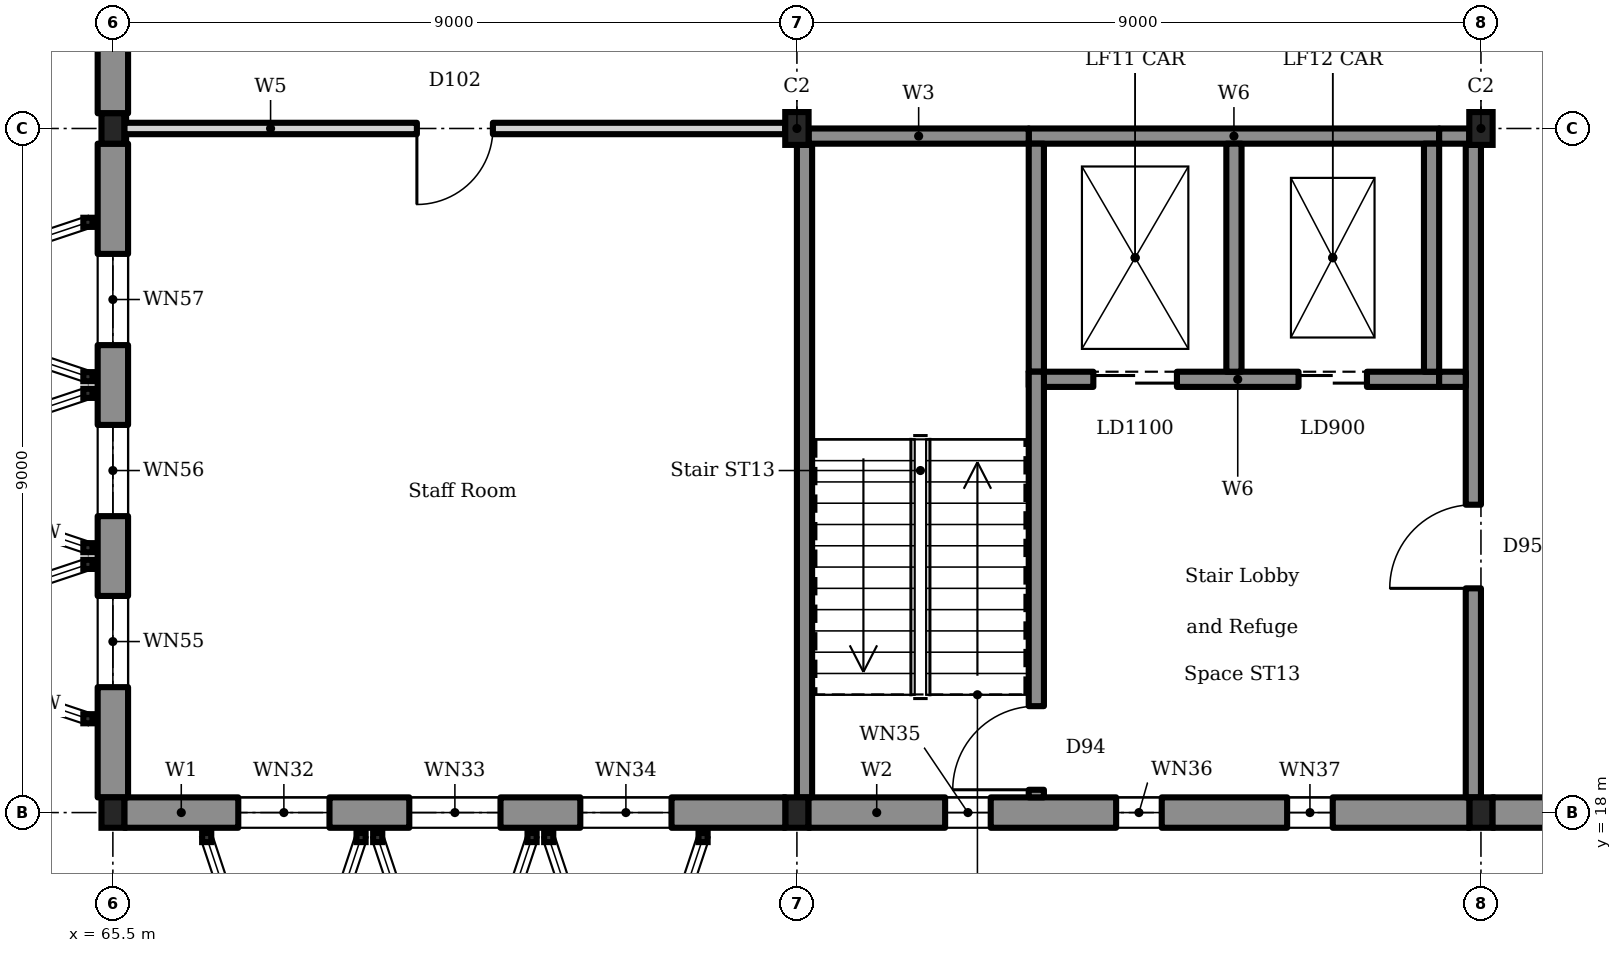
"""IFC4 building model, lengths in metres.
Left out: names, types, materials, properties, quantities, classifications, styles, units other than length and angle.
Written with IfcOpenShell. Run it as: python <this file> out.ifc"""

import sys

from ifc_helpers import new_model, si_unit, direction, frame, frame_2d, origin, origin_2d, place, context, subcontext, project, spatial, rectangle, i_section, extrude, element, fill, save


model = new_model("IFC4")
c1 = context("Model", 3, precision=1e-05, world=origin(), true_north=direction((0.0, 1.0)))
c2 = subcontext(c1, "Body", "Model", "MODEL_VIEW")
j1 = project(units=[si_unit("LENGTHUNIT", "METRE"), si_unit("PLANEANGLEUNIT", "RADIAN")], contexts=[c1])
p1 = place(None, origin())
s1 = spatial("IfcSite", under=j1, at=p1, CompositionType="ELEMENT")
p2 = place(p1, origin())
s2 = spatial("IfcBuilding", under=s1, at=p2, CompositionType="ELEMENT")
p3 = place(p2, frame((0.0, 0.0, 5.4)))
s3 = spatial("IfcBuildingStorey", under=s2, at=p3, CompositionType="ELEMENT", Elevation=5.4)
for number, where, z_axis, x_axis in (
    (1, (65.5, 18.0, 0.0), (0.0, 0.0, 1.0), (1.0, 0.0, 0.0)),
    (2, (74.5, 18.0, 0.0), (0.0, 0.0, 1.0), (1.0, 0.0, 0.0)),
    (3, (83.5, 18.0, 0.0), (0.0, 0.0, 1.0), (1.0, 0.0, 0.0)),
    (4, (65.5, 27.0, 0.0), (0.0, 0.0, 1.0), (1.0, 0.0, 0.0)),
):
    element("IfcColumn", number, at=place(p3, frame(where, z_axis=z_axis, x_axis=x_axis)), inside=s3, PredefinedType="COLUMN", context=c2, shape_type="SweptSolid", body=[
        extrude(i_section(OverallWidth=0.3, OverallDepth=0.4, WebThickness=0.013, FlangeThickness=0.024, FilletRadius=0.027, at=origin_2d()), origin(), (0.0, 0.0, 1.0), 4.5),
    ])
for number, where, z_axis, x_axis in (
    (5, (74.5, 27.0, 0.0), (0.0, 0.0, 1.0), (1.0, 0.0, 0.0)),
    (6, (83.5, 27.0, 0.0), (0.0, 0.0, 1.0), (1.0, 0.0, 0.0)),
):
    element("IfcColumn", number, at=place(p3, frame(where, z_axis=z_axis, x_axis=x_axis)), inside=s3, PredefinedType="COLUMN", context=c2, shape_type="SweptSolid", body=[
        extrude(i_section(OverallWidth=0.307, OverallDepth=0.432, WebThickness=0.021, FlangeThickness=0.04, FilletRadius=0.027, at=origin_2d()), origin(), (0.0, 0.0, 1.0), 4.5),
    ])
p4 = place(p3, frame((77.55, 23.7, 0.0), z_axis=(0.0, 0.0, 1.0), x_axis=(1.0, 0.0, 0.0)))
e7 = element("IfcWall", 7, at=p4, inside=s3, PredefinedType="SOLIDWALL", context=c2, shape_type="SweptSolid", body=[
    extrude(rectangle(XDim=5.4, YDim=0.2, at=frame_2d((2.7, 0.0))), origin(), (0.0, 0.0, 1.0), 4.25),
])
p5 = place(p4, frame((0.85, 0.0, 0.0)))
e8 = element("IfcOpeningElement", 8, at=p5, cuts=e7, PredefinedType="OPENING", context=c2, shape_type="SweptSolid", body=[
    extrude(rectangle(XDim=1.1, YDim=2.1, at=frame_2d((0.55, 1.05))), frame((0.0, 0.11, 0.0), z_axis=(0.0, -1.0, 0.0), x_axis=(1.0, 0.0, 0.0)), (0.0, 0.0, 1.0), 0.22),
])
p6 = place(p4, frame((3.55, 0.0, 0.0)))
e9 = element("IfcOpeningElement", 9, at=p6, cuts=e7, PredefinedType="OPENING", context=c2, shape_type="SweptSolid", body=[
    extrude(rectangle(XDim=0.9, YDim=2.1, at=frame_2d((0.45, 1.05))), frame((0.0, 0.11, 0.0), z_axis=(0.0, -1.0, 0.0), x_axis=(1.0, 0.0, 0.0)), (0.0, 0.0, 1.0), 0.22),
])
p7 = place(p3, frame((77.55, 26.9, 0.0), z_axis=(0.0, 0.0, 1.0), x_axis=(1.0, 0.0, 0.0)))
e10 = element("IfcWall", 10, at=p7, inside=s3, PredefinedType="SOLIDWALL", context=c2, shape_type="SweptSolid", body=[
    extrude(rectangle(XDim=5.4, YDim=0.2, at=frame_2d((2.7, 0.0))), origin(), (0.0, 0.0, 1.0), 4.25),
])
for number, where, z_axis, x_axis in (
    (11, (77.65, 23.8, 0.0), (0.0, 0.0, 1.0), (0.0, 1.0, 0.0)),
    (12, (80.25, 23.8, 0.0), (0.0, 0.0, 1.0), (0.0, 1.0, 0.0)),
    (13, (82.85, 23.8, 0.0), (0.0, 0.0, 1.0), (0.0, 1.0, 0.0)),
):
    element("IfcWall", number, at=place(p3, frame(where, z_axis=z_axis, x_axis=x_axis)), inside=s3, PredefinedType="SOLIDWALL", context=c2, shape_type="SweptSolid", body=[
        extrude(rectangle(XDim=3.0, YDim=0.2, at=frame_2d((1.5, 0.0))), origin(), (0.0, 0.0, 1.0), 4.25),
    ])
p8 = place(p3, frame((65.65, 18.0, 0.0), z_axis=(0.0, 0.0, 1.0), x_axis=(1.0, 0.0, 0.0)))
e14 = element("IfcWall", 14, at=p8, inside=s3, PredefinedType="SOLIDWALL", context=c2, shape_type="SweptSolid", body=[
    extrude(rectangle(XDim=8.7, YDim=0.4, at=frame_2d((4.35, 0.0))), origin(), (0.0, 0.0, 1.0), 4.5),
])
p9 = place(p8, frame((1.5, 0.0, 0.9)))
e15 = element("IfcOpeningElement", 15, at=p9, cuts=e14, PredefinedType="OPENING", context=c2, shape_type="SweptSolid", body=[
    extrude(rectangle(XDim=1.2, YDim=1.8, at=frame_2d((0.6, 0.9))), frame((0.0, 0.21, 0.0), z_axis=(0.0, -1.0, 0.0), x_axis=(1.0, 0.0, 0.0)), (0.0, 0.0, 1.0), 0.42),
])
p10 = place(p8, frame((3.75, 0.0, 0.9)))
e16 = element("IfcOpeningElement", 16, at=p10, cuts=e14, PredefinedType="OPENING", context=c2, shape_type="SweptSolid", body=[
    extrude(rectangle(XDim=1.2, YDim=1.8, at=frame_2d((0.6, 0.9))), frame((0.0, 0.21, 0.0), z_axis=(0.0, -1.0, 0.0), x_axis=(1.0, 0.0, 0.0)), (0.0, 0.0, 1.0), 0.42),
])
p11 = place(p8, frame((6.0, 0.0, 0.9)))
e17 = element("IfcOpeningElement", 17, at=p11, cuts=e14, PredefinedType="OPENING", context=c2, shape_type="SweptSolid", body=[
    extrude(rectangle(XDim=1.2, YDim=1.8, at=frame_2d((0.6, 0.9))), frame((0.0, 0.21, 0.0), z_axis=(0.0, -1.0, 0.0), x_axis=(1.0, 0.0, 0.0)), (0.0, 0.0, 1.0), 0.42),
])
p12 = place(p3, frame((74.65, 18.0, 0.0), z_axis=(0.0, 0.0, 1.0), x_axis=(1.0, 0.0, 0.0)))
e18 = element("IfcWall", 18, at=p12, inside=s3, PredefinedType="SOLIDWALL", context=c2, shape_type="SweptSolid", body=[
    extrude(rectangle(XDim=8.7, YDim=0.4, at=frame_2d((4.35, 0.0))), origin(), (0.0, 0.0, 1.0), 4.5),
])
p13 = place(p12, frame((1.8, 0.0, 0.9)))
e19 = element("IfcOpeningElement", 19, at=p13, cuts=e18, PredefinedType="OPENING", context=c2, shape_type="SweptSolid", body=[
    extrude(rectangle(XDim=0.6, YDim=2.4, at=frame_2d((0.3, 1.2))), frame((0.0, 0.21, 0.0), z_axis=(0.0, -1.0, 0.0), x_axis=(1.0, 0.0, 0.0)), (0.0, 0.0, 1.0), 0.42),
])
p14 = place(p12, frame((4.05, 0.0, 0.9)))
e20 = element("IfcOpeningElement", 20, at=p14, cuts=e18, PredefinedType="OPENING", context=c2, shape_type="SweptSolid", body=[
    extrude(rectangle(XDim=0.6, YDim=2.4, at=frame_2d((0.3, 1.2))), frame((0.0, 0.21, 0.0), z_axis=(0.0, -1.0, 0.0), x_axis=(1.0, 0.0, 0.0)), (0.0, 0.0, 1.0), 0.42),
])
p15 = place(p12, frame((6.3, 0.0, 0.9)))
e21 = element("IfcOpeningElement", 21, at=p15, cuts=e18, PredefinedType="OPENING", context=c2, shape_type="SweptSolid", body=[
    extrude(rectangle(XDim=0.6, YDim=2.4, at=frame_2d((0.3, 1.2))), frame((0.0, 0.21, 0.0), z_axis=(0.0, -1.0, 0.0), x_axis=(1.0, 0.0, 0.0)), (0.0, 0.0, 1.0), 0.42),
])
p16 = place(p3, frame((83.65, 18.0, 0.0), z_axis=(0.0, 0.0, 1.0), x_axis=(1.0, 0.0, 0.0)))
e22 = element("IfcWall", 22, at=p16, inside=s3, PredefinedType="SOLIDWALL", context=c2, shape_type="SweptSolid", body=[
    extrude(rectangle(XDim=8.7, YDim=0.4, at=frame_2d((4.35, 0.0))), origin(), (0.0, 0.0, 1.0), 4.5),
])
p17 = place(p16, frame((3.15, 0.0, 2.6)))
e23 = element("IfcOpeningElement", 23, at=p17, cuts=e22, PredefinedType="OPENING", context=c2, shape_type="SweptSolid", body=[
    extrude(rectangle(XDim=2.4, YDim=1.0, at=frame_2d((1.2, 0.5))), frame((0.0, 0.21, 0.0), z_axis=(0.0, -1.0, 0.0), x_axis=(1.0, 0.0, 0.0)), (0.0, 0.0, 1.0), 0.42),
])
p18 = place(p3, frame((65.5, 18.2, 0.0), z_axis=(0.0, 0.0, 1.0), x_axis=(0.0, 1.0, 0.0)))
e24 = element("IfcWall", 24, at=p18, inside=s3, PredefinedType="SOLIDWALL", context=c2, shape_type="SweptSolid", body=[
    extrude(rectangle(XDim=8.6, YDim=0.4, at=frame_2d((4.3, 0.0))), origin(), (0.0, 0.0, 1.0), 4.5),
])
p19 = place(p18, frame((1.45, 0.0, 0.9)))
e25 = element("IfcOpeningElement", 25, at=p19, cuts=e24, PredefinedType="OPENING", context=c2, shape_type="SweptSolid", body=[
    extrude(rectangle(XDim=1.2, YDim=1.8, at=frame_2d((0.6, 0.9))), frame((0.0, 0.21, 0.0), z_axis=(0.0, -1.0, 0.0), x_axis=(1.0, 0.0, 0.0)), (0.0, 0.0, 1.0), 0.42),
])
p20 = place(p18, frame((3.7, 0.0, 0.9)))
e26 = element("IfcOpeningElement", 26, at=p20, cuts=e24, PredefinedType="OPENING", context=c2, shape_type="SweptSolid", body=[
    extrude(rectangle(XDim=1.2, YDim=1.8, at=frame_2d((0.6, 0.9))), frame((0.0, 0.21, 0.0), z_axis=(0.0, -1.0, 0.0), x_axis=(1.0, 0.0, 0.0)), (0.0, 0.0, 1.0), 0.42),
])
p21 = place(p18, frame((5.95, 0.0, 0.9)))
e27 = element("IfcOpeningElement", 27, at=p21, cuts=e24, PredefinedType="OPENING", context=c2, shape_type="SweptSolid", body=[
    extrude(rectangle(XDim=1.2, YDim=1.8, at=frame_2d((0.6, 0.9))), frame((0.0, 0.21, 0.0), z_axis=(0.0, -1.0, 0.0), x_axis=(1.0, 0.0, 0.0)), (0.0, 0.0, 1.0), 0.42),
])
p22 = place(p3, frame((65.5, 27.2, 0.0), z_axis=(0.0, 0.0, 1.0), x_axis=(0.0, 1.0, 0.0)))
e28 = element("IfcWall", 28, at=p22, inside=s3, PredefinedType="SOLIDWALL", context=c2, shape_type="SweptSolid", body=[
    extrude(rectangle(XDim=8.6, YDim=0.4, at=frame_2d((4.3, 0.0))), origin(), (0.0, 0.0, 1.0), 4.5),
])
p23 = place(p3, frame((74.654, 26.9, 0.0), z_axis=(0.0, 0.0, 1.0), x_axis=(1.0, 0.0, 0.0)))
e29 = element("IfcWall", 29, at=p23, inside=s3, PredefinedType="SOLIDWALL", context=c2, shape_type="SweptSolid", body=[
    extrude(rectangle(XDim=2.896, YDim=0.2, at=frame_2d((1.448, 0.0))), origin(), (0.0, 0.0, 1.0), 4.25),
])
p24 = place(p3, frame((82.95, 26.9, 0.0), z_axis=(0.0, 0.0, 1.0), x_axis=(1.0, 0.0, 0.0)))
e30 = element("IfcWall", 30, at=p24, inside=s3, PredefinedType="SOLIDWALL", context=c2, shape_type="SweptSolid", body=[
    extrude(rectangle(XDim=0.396, YDim=0.2, at=frame_2d((0.198, 0.0))), origin(), (0.0, 0.0, 1.0), 4.25),
])
p25 = place(p3, frame((74.6, 18.2, 0.0), z_axis=(0.0, 0.0, 1.0), x_axis=(0.0, 1.0, 0.0)))
e31 = element("IfcWall", 31, at=p25, inside=s3, PredefinedType="SOLIDWALL", context=c2, shape_type="SweptSolid", body=[
    extrude(rectangle(XDim=8.584, YDim=0.2, at=frame_2d((4.292, 0.0))), origin(), (0.0, 0.0, 1.0), 4.25),
])
p26 = place(p3, frame((83.4, 18.2, 0.0), z_axis=(0.0, 0.0, 1.0), x_axis=(0.0, 1.0, 0.0)))
e32 = element("IfcWall", 32, at=p26, inside=s3, PredefinedType="SOLIDWALL", context=c2, shape_type="SweptSolid", body=[
    extrude(rectangle(XDim=8.584, YDim=0.2, at=frame_2d((4.292, 0.0))), origin(), (0.0, 0.0, 1.0), 4.25),
])
p27 = place(p26, frame((2.75, 0.0, 0.0)))
e33 = element("IfcOpeningElement", 33, at=p27, cuts=e32, PredefinedType="OPENING", context=c2, shape_type="SweptSolid", body=[
    extrude(rectangle(XDim=1.1, YDim=2.1, at=frame_2d((0.55, 1.05))), frame((0.0, 0.11, 0.0), z_axis=(0.0, -1.0, 0.0), x_axis=(1.0, 0.0, 0.0)), (0.0, 0.0, 1.0), 0.22),
])
p28 = place(p3, frame((77.65, 18.2, 0.0), z_axis=(0.0, 0.0, 1.0), x_axis=(0.0, 1.0, 0.0)))
e34 = element("IfcWall", 34, at=p28, inside=s3, PredefinedType="SOLIDWALL", context=c2, shape_type="SweptSolid", body=[
    extrude(rectangle(XDim=5.6, YDim=0.2, at=frame_2d((2.8, 0.0))), origin(), (0.0, 0.0, 1.0), 4.25),
])
p29 = place(p28, frame((0.1, 0.0, 0.0)))
e35 = element("IfcOpeningElement", 35, at=p29, cuts=e34, PredefinedType="OPENING", context=c2, shape_type="SweptSolid", body=[
    extrude(rectangle(XDim=1.1, YDim=2.1, at=frame_2d((0.55, 1.05))), frame((0.0, 0.11, 0.0), z_axis=(0.0, -1.0, 0.0), x_axis=(1.0, 0.0, 0.0)), (0.0, 0.0, 1.0), 0.22),
])
p30 = place(p3, frame((82.95, 23.7, 0.0), z_axis=(0.0, 0.0, 1.0), x_axis=(1.0, 0.0, 0.0)))
e36 = element("IfcWall", 36, at=p30, inside=s3, PredefinedType="SOLIDWALL", context=c2, shape_type="SweptSolid", body=[
    extrude(rectangle(XDim=0.35, YDim=0.2, at=frame_2d((0.175, 0.0))), origin(), (0.0, 0.0, 1.0), 4.25),
])
p31 = place(p3, frame((65.65, 27.0, 0.0), z_axis=(0.0, 0.0, 1.0), x_axis=(1.0, 0.0, 0.0)))
e37 = element("IfcWall", 37, at=p31, inside=s3, PredefinedType="PARTITIONING", context=c2, shape_type="SweptSolid", body=[
    extrude(rectangle(XDim=8.697, YDim=0.15, at=frame_2d((4.348, 0.0))), origin(), (0.0, 0.0, 1.0), 3.6),
])
p32 = place(p31, frame((3.85, 0.0, 0.0)))
e38 = element("IfcOpeningElement", 38, at=p32, cuts=e37, PredefinedType="OPENING", context=c2, shape_type="SweptSolid", body=[
    extrude(rectangle(XDim=1.0, YDim=2.1, at=frame_2d((0.5, 1.05))), frame((0.0, 0.085, 0.0), z_axis=(0.0, -1.0, 0.0), x_axis=(1.0, 0.0, 0.0)), (0.0, 0.0, 1.0), 0.17),
])
p33 = place(p5, origin())
e39 = element("IfcDoor", 39, at=p33, inside=s3, OperationType="SLIDING_TO_LEFT", PredefinedType="DOOR", context=c2, shape_type="SweptSolid", body=[
    extrude(rectangle(XDim=1.1, YDim=2.1, at=frame_2d((0.55, 1.05))), frame((0.0, 0.025, 0.0), z_axis=(0.0, -1.0, 0.0), x_axis=(1.0, 0.0, 0.0)), (0.0, 0.0, 1.0), 0.05),
])
fill(e8, e39)
p34 = place(p6, origin())
e40 = element("IfcDoor", 40, at=p34, inside=s3, OperationType="SLIDING_TO_LEFT", PredefinedType="DOOR", context=c2, shape_type="SweptSolid", body=[
    extrude(rectangle(XDim=0.9, YDim=2.1, at=frame_2d((0.45, 1.05))), frame((0.0, 0.025, 0.0), z_axis=(0.0, -1.0, 0.0), x_axis=(1.0, 0.0, 0.0)), (0.0, 0.0, 1.0), 0.05),
])
fill(e9, e40)
p35 = place(p9, origin())
e41 = element("IfcWindow", 41, at=p35, inside=s3, PartitioningType="SINGLE_PANEL", PredefinedType="WINDOW", context=c2, shape_type="SweptSolid", body=[
    extrude(rectangle(XDim=1.2, YDim=1.8, at=frame_2d((0.6, 0.9))), frame((0.0, 0.03, 0.0), z_axis=(0.0, -1.0, 0.0), x_axis=(1.0, 0.0, 0.0)), (0.0, 0.0, 1.0), 0.06),
])
fill(e15, e41)
p36 = place(p10, origin())
e42 = element("IfcWindow", 42, at=p36, inside=s3, PartitioningType="SINGLE_PANEL", PredefinedType="WINDOW", context=c2, shape_type="SweptSolid", body=[
    extrude(rectangle(XDim=1.2, YDim=1.8, at=frame_2d((0.6, 0.9))), frame((0.0, 0.03, 0.0), z_axis=(0.0, -1.0, 0.0), x_axis=(1.0, 0.0, 0.0)), (0.0, 0.0, 1.0), 0.06),
])
fill(e16, e42)
p37 = place(p11, origin())
e43 = element("IfcWindow", 43, at=p37, inside=s3, PartitioningType="SINGLE_PANEL", PredefinedType="WINDOW", context=c2, shape_type="SweptSolid", body=[
    extrude(rectangle(XDim=1.2, YDim=1.8, at=frame_2d((0.6, 0.9))), frame((0.0, 0.03, 0.0), z_axis=(0.0, -1.0, 0.0), x_axis=(1.0, 0.0, 0.0)), (0.0, 0.0, 1.0), 0.06),
])
fill(e17, e43)
p38 = place(p13, origin())
e44 = element("IfcWindow", 44, at=p38, inside=s3, PartitioningType="SINGLE_PANEL", PredefinedType="WINDOW", context=c2, shape_type="SweptSolid", body=[
    extrude(rectangle(XDim=0.6, YDim=2.4, at=frame_2d((0.3, 1.2))), frame((0.0, 0.03, 0.0), z_axis=(0.0, -1.0, 0.0), x_axis=(1.0, 0.0, 0.0)), (0.0, 0.0, 1.0), 0.06),
])
fill(e19, e44)
p39 = place(p14, origin())
e45 = element("IfcWindow", 45, at=p39, inside=s3, PartitioningType="SINGLE_PANEL", PredefinedType="WINDOW", context=c2, shape_type="SweptSolid", body=[
    extrude(rectangle(XDim=0.6, YDim=2.4, at=frame_2d((0.3, 1.2))), frame((0.0, 0.03, 0.0), z_axis=(0.0, -1.0, 0.0), x_axis=(1.0, 0.0, 0.0)), (0.0, 0.0, 1.0), 0.06),
])
fill(e20, e45)
p40 = place(p15, origin())
e46 = element("IfcWindow", 46, at=p40, inside=s3, PartitioningType="SINGLE_PANEL", PredefinedType="WINDOW", context=c2, shape_type="SweptSolid", body=[
    extrude(rectangle(XDim=0.6, YDim=2.4, at=frame_2d((0.3, 1.2))), frame((0.0, 0.03, 0.0), z_axis=(0.0, -1.0, 0.0), x_axis=(1.0, 0.0, 0.0)), (0.0, 0.0, 1.0), 0.06),
])
fill(e21, e46)
p41 = place(p19, origin())
e47 = element("IfcWindow", 47, at=p41, inside=s3, PartitioningType="SINGLE_PANEL", PredefinedType="WINDOW", context=c2, shape_type="SweptSolid", body=[
    extrude(rectangle(XDim=1.2, YDim=1.8, at=frame_2d((0.6, 0.9))), frame((0.0, 0.03, 0.0), z_axis=(0.0, -1.0, 0.0), x_axis=(1.0, 0.0, 0.0)), (0.0, 0.0, 1.0), 0.06),
])
fill(e25, e47)
p42 = place(p20, origin())
e48 = element("IfcWindow", 48, at=p42, inside=s3, PartitioningType="SINGLE_PANEL", PredefinedType="WINDOW", context=c2, shape_type="SweptSolid", body=[
    extrude(rectangle(XDim=1.2, YDim=1.8, at=frame_2d((0.6, 0.9))), frame((0.0, 0.03, 0.0), z_axis=(0.0, -1.0, 0.0), x_axis=(1.0, 0.0, 0.0)), (0.0, 0.0, 1.0), 0.06),
])
fill(e26, e48)
p43 = place(p21, origin())
e49 = element("IfcWindow", 49, at=p43, inside=s3, PartitioningType="SINGLE_PANEL", PredefinedType="WINDOW", context=c2, shape_type="SweptSolid", body=[
    extrude(rectangle(XDim=1.2, YDim=1.8, at=frame_2d((0.6, 0.9))), frame((0.0, 0.03, 0.0), z_axis=(0.0, -1.0, 0.0), x_axis=(1.0, 0.0, 0.0)), (0.0, 0.0, 1.0), 0.06),
])
fill(e27, e49)
p44 = place(p29, origin())
e50 = element("IfcDoor", 50, at=p44, inside=s3, OperationType="SINGLE_SWING_RIGHT", PredefinedType="DOOR", context=c2, shape_type="SweptSolid", body=[
    extrude(rectangle(XDim=1.1, YDim=2.1, at=frame_2d((0.55, 1.05))), frame((0.0, 0.025, 0.0), z_axis=(0.0, -1.0, 0.0), x_axis=(1.0, 0.0, 0.0)), (0.0, 0.0, 1.0), 0.05),
])
fill(e35, e50)
p45 = place(p27, origin())
e51 = element("IfcDoor", 51, at=p45, inside=s3, OperationType="SINGLE_SWING_RIGHT", PredefinedType="DOOR", context=c2, shape_type="SweptSolid", body=[
    extrude(rectangle(XDim=1.1, YDim=2.1, at=frame_2d((0.55, 1.05))), frame((0.0, 0.025, 0.0), z_axis=(0.0, -1.0, 0.0), x_axis=(1.0, 0.0, 0.0)), (0.0, 0.0, 1.0), 0.05),
])
fill(e33, e51)
p46 = place(p32, frame((1.0, 0.0, 0.0), z_axis=(0.0, 0.0, 1.0), x_axis=(-1.0, 0.0, 0.0)))
e52 = element("IfcDoor", 52, at=p46, inside=s3, OperationType="SINGLE_SWING_LEFT", PredefinedType="DOOR", context=c2, shape_type="SweptSolid", body=[
    extrude(rectangle(XDim=1.0, YDim=2.1, at=frame_2d((0.5, 1.05))), frame((0.0, 0.025, 0.0), z_axis=(0.0, -1.0, 0.0), x_axis=(1.0, 0.0, 0.0)), (0.0, 0.0, 1.0), 0.05),
])
fill(e38, e52)
save(model, sys.argv[1])
